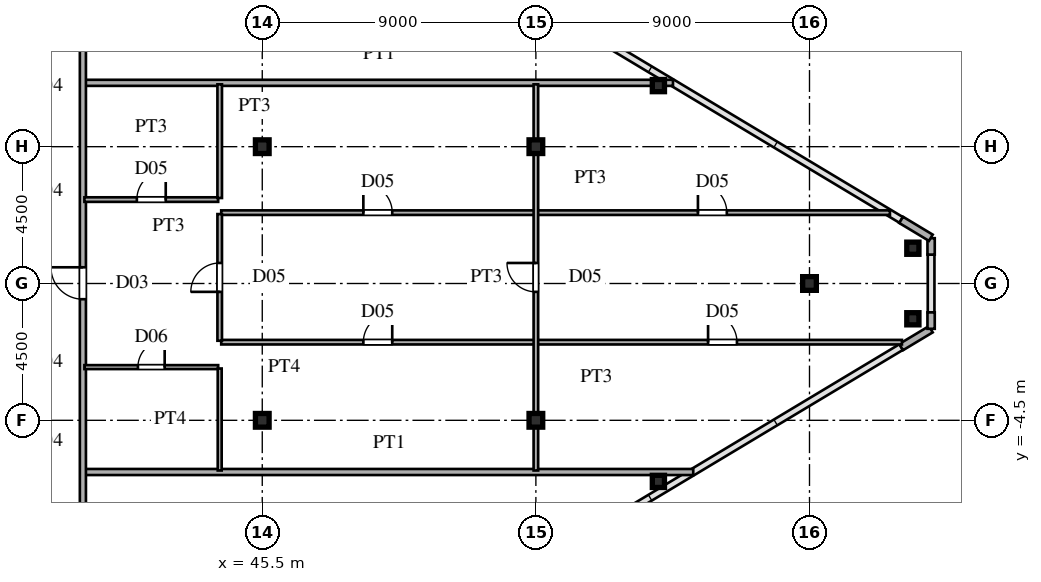
"""IFC4 building model, lengths in metres.
Left out: names, types, materials, properties, quantities, classifications, styles, units other than length and angle.
Written with IfcOpenShell. Run it as: python <this file> out.ifc"""

import sys

from ifc_helpers import new_model, si_unit, direction, frame, frame_2d, origin, origin_2d, place, context, subcontext, project, spatial, rectangle, hollow_rectangle, i_section, extrude, source, transform, mapped, element, fill, save


model = new_model("IFC4")
c1 = context("Model", 3, precision=1e-05, world=origin(), true_north=direction((0.0, 1.0)))
c2 = subcontext(c1, "Body", "Model", "MODEL_VIEW")
j1 = project(units=[si_unit("LENGTHUNIT", "METRE"), si_unit("PLANEANGLEUNIT", "RADIAN")], contexts=[c1])
p1 = place(None, origin())
s1 = spatial("IfcSite", under=j1, at=p1, CompositionType="ELEMENT")
p2 = place(p1, origin())
s2 = spatial("IfcBuilding", under=s1, at=p2, CompositionType="ELEMENT")
p3 = place(p2, frame((0.0, 0.0, 243.15)))
s3 = spatial("IfcBuildingStorey", under=s2, at=p3, CompositionType="ELEMENT", Elevation=243.15)
m1 = source(origin(), c2, "Body", "SweptSolid", [
    extrude(i_section(OverallWidth=0.45, OverallDepth=0.45, WebThickness=0.016, FlangeThickness=0.025, at=origin_2d()), origin(), (0.0, 0.0, 1.0), 3.75),
])
for number, where, z_axis, x_axis in (
    (1, (45.5, -4.5, 0.0), (0.0, 0.0, 1.0), (1.0, 0.0, 0.0)),
    (2, (45.5, 4.5, 0.0), (0.0, 0.0, 1.0), (1.0, 0.0, 0.0)),
    (3, (54.5, -4.5, 0.0), (0.0, 0.0, 1.0), (1.0, 0.0, 0.0)),
    (4, (54.5, 4.5, 0.0), (0.0, 0.0, 1.0), (1.0, 0.0, 0.0)),
    (5, (63.5, 0.0, 0.0), (0.0, 0.0, 1.0), (1.0, 0.0, 0.0)),
):
    element("IfcColumn", number, at=place(p3, frame(where, z_axis=z_axis, x_axis=x_axis)), inside=s3, PredefinedType="COLUMN", context=c2, shape_type="MappedRepresentation", body=[
        mapped(m1, transform((0.0, 0.0, 0.0), scale=1.0)),
    ])
m2 = source(origin(), c2, "Body", "SweptSolid", [
    extrude(hollow_rectangle(XDim=0.4, YDim=0.4, WallThickness=0.016, at=origin_2d()), origin(), (0.0, 0.0, 1.0), 3.75),
])
for number, where, z_axis, x_axis in (
    (6, (66.9, -1.16, 0.0), (0.0, 0.0, 1.0), (1.0, 0.0, 0.0)),
    (7, (66.9, 1.16, 0.0), (0.0, 0.0, 1.0), (1.0, 0.0, 0.0)),
    (8, (58.53, -6.509, 0.0), (0.0, 0.0, 1.0), (1.0, 0.0, 0.0)),
    (9, (58.53, 6.509, 0.0), (0.0, 0.0, 1.0), (1.0, 0.0, 0.0)),
):
    element("IfcColumn", number, at=place(p3, frame(where, z_axis=z_axis, x_axis=x_axis)), inside=s3, PredefinedType="COLUMN", context=c2, shape_type="MappedRepresentation", body=[
        mapped(m2, transform((0.0, 0.0, 0.0), scale=1.0)),
    ])
p4 = place(p3, frame((66.514, -2.092, 0.0), z_axis=(0.0, 0.0, 1.0), x_axis=(0.85743623509, 0.514590228002, 0.0)))
e10 = element("IfcWall", 10, at=p4, inside=s3, PredefinedType="SOLIDWALL", context=c2, shape_type="SweptSolid", body=[
    extrude(rectangle(XDim=1.14, YDim=0.24, at=frame_2d((0.57, 0.0))), origin(), (0.0, 0.0, 1.0), 3.53),
])
for number, where, z_axis, x_axis in (
    (11, (67.5, -1.49, 0.0), (0.0, 0.0, 1.0), (0.0, 1.0, 0.0)),
    (12, (67.5, 0.95, 0.0), (0.0, 0.0, 1.0), (0.0, 1.0, 0.0)),
):
    element("IfcWall", number, at=place(p3, frame(where, z_axis=z_axis, x_axis=x_axis)), inside=s3, PredefinedType="SOLIDWALL", context=c2, shape_type="SweptSolid", body=[
        extrude(rectangle(XDim=0.54, YDim=0.24, at=frame_2d((0.27, 0.0))), origin(), (0.0, 0.0, 1.0), 3.53),
    ])
p5 = place(p3, frame((67.491, 1.505, 0.0), z_axis=(0.0, 0.0, 1.0), x_axis=(-0.85743623509, 0.514590228002, 0.0)))
e13 = element("IfcWall", 13, at=p5, inside=s3, PredefinedType="SOLIDWALL", context=c2, shape_type="SweptSolid", body=[
    extrude(rectangle(XDim=1.14, YDim=0.24, at=frame_2d((0.57, 0.0))), origin(), (0.0, 0.0, 1.0), 3.53),
])
p6 = place(p3, frame((39.68, -6.2, 0.0), z_axis=(0.0, 0.0, 1.0), x_axis=(1.0, 0.0, 0.0)))
e14 = element("IfcWall", 14, at=p6, inside=s3, PredefinedType="PARTITIONING", context=c2, shape_type="SweptSolid", body=[
    extrude(rectangle(XDim=19.996, YDim=0.2, at=frame_2d((9.998, 0.0))), origin(), (0.0, 0.0, 1.0), 3.53),
])
p7 = place(p3, frame((39.65, -2.75, 0.0), z_axis=(0.0, 0.0, 1.0), x_axis=(1.0, 0.0, 0.0)))
e15 = element("IfcWall", 15, at=p7, inside=s3, PredefinedType="PARTITIONING", context=c2, shape_type="SweptSolid", body=[
    extrude(rectangle(XDim=4.4, YDim=0.13, at=frame_2d((2.2, 0.0))), origin(), (0.0, 0.0, 1.0), 3.53),
])
p8 = place(p7, frame((1.76, 0.0, 0.0)))
e16 = element("IfcOpeningElement", 16, at=p8, cuts=e15, PredefinedType="OPENING", context=c2, shape_type="SweptSolid", body=[
    extrude(rectangle(XDim=0.88, YDim=2.1, at=frame_2d((0.44, 1.05))), frame((0.0, 0.075, 0.0), z_axis=(0.0, -1.0, 0.0), x_axis=(1.0, 0.0, 0.0)), (0.0, 0.0, 1.0), 0.15),
])
p9 = place(p3, frame((44.15, -1.93, 0.0), z_axis=(0.0, 0.0, 1.0), x_axis=(1.0, 0.0, 0.0)))
e17 = element("IfcWall", 17, at=p9, inside=s3, PredefinedType="PARTITIONING", context=c2, shape_type="SweptSolid", body=[
    extrude(rectangle(XDim=22.39, YDim=0.15, at=frame_2d((11.195, 0.0))), origin(), (0.0, 0.0, 1.0), 3.53),
])
p10 = place(p9, frame((4.675, 0.0, 0.0)))
e18 = element("IfcOpeningElement", 18, at=p10, cuts=e17, PredefinedType="OPENING", context=c2, shape_type="SweptSolid", body=[
    extrude(rectangle(XDim=0.95, YDim=2.15, at=frame_2d((0.475, 1.075))), frame((0.0, 0.085, 0.0), z_axis=(0.0, -1.0, 0.0), x_axis=(1.0, 0.0, 0.0)), (0.0, 0.0, 1.0), 0.17),
])
p11 = place(p9, frame((16.014, 0.0, 0.0)))
e19 = element("IfcOpeningElement", 19, at=p11, cuts=e17, PredefinedType="OPENING", context=c2, shape_type="SweptSolid", body=[
    extrude(rectangle(XDim=0.95, YDim=2.15, at=frame_2d((0.475, 1.075))), frame((0.0, 0.085, 0.0), z_axis=(0.0, -1.0, 0.0), x_axis=(1.0, 0.0, 0.0)), (0.0, 0.0, 1.0), 0.17),
])
p12 = place(p3, frame((44.15, 2.33, 0.0), z_axis=(0.0, 0.0, 1.0), x_axis=(1.0, 0.0, 0.0)))
e20 = element("IfcWall", 20, at=p12, inside=s3, PredefinedType="PARTITIONING", context=c2, shape_type="SweptSolid", body=[
    extrude(rectangle(XDim=21.996, YDim=0.15, at=frame_2d((10.998, 0.0))), origin(), (0.0, 0.0, 1.0), 3.53),
])
p13 = place(p12, frame((4.675, 0.0, 0.0)))
e21 = element("IfcOpeningElement", 21, at=p13, cuts=e20, PredefinedType="OPENING", context=c2, shape_type="SweptSolid", body=[
    extrude(rectangle(XDim=0.95, YDim=2.15, at=frame_2d((0.475, 1.075))), frame((0.0, 0.085, 0.0), z_axis=(0.0, -1.0, 0.0), x_axis=(1.0, 0.0, 0.0)), (0.0, 0.0, 1.0), 0.17),
])
p14 = place(p12, frame((15.681, 0.0, 0.0)))
e22 = element("IfcOpeningElement", 22, at=p14, cuts=e20, PredefinedType="OPENING", context=c2, shape_type="SweptSolid", body=[
    extrude(rectangle(XDim=0.95, YDim=2.15, at=frame_2d((0.475, 1.075))), frame((0.0, 0.085, 0.0), z_axis=(0.0, -1.0, 0.0), x_axis=(1.0, 0.0, 0.0)), (0.0, 0.0, 1.0), 0.17),
])
p15 = place(p3, frame((39.65, 2.76, 0.0), z_axis=(0.0, 0.0, 1.0), x_axis=(1.0, 0.0, 0.0)))
e23 = element("IfcWall", 23, at=p15, inside=s3, PredefinedType="PARTITIONING", context=c2, shape_type="SweptSolid", body=[
    extrude(rectangle(XDim=4.4, YDim=0.15, at=frame_2d((2.2, 0.0))), origin(), (0.0, 0.0, 1.0), 3.53),
])
p16 = place(p15, frame((1.725, 0.0, 0.0)))
e24 = element("IfcOpeningElement", 24, at=p16, cuts=e23, PredefinedType="OPENING", context=c2, shape_type="SweptSolid", body=[
    extrude(rectangle(XDim=0.95, YDim=2.15, at=frame_2d((0.475, 1.075))), frame((0.0, 0.085, 0.0), z_axis=(0.0, -1.0, 0.0), x_axis=(1.0, 0.0, 0.0)), (0.0, 0.0, 1.0), 0.17),
])
p17 = place(p3, frame((39.68, 6.6, 0.0), z_axis=(0.0, 0.0, 1.0), x_axis=(1.0, 0.0, 0.0)))
e25 = element("IfcWall", 25, at=p17, inside=s3, PredefinedType="PARTITIONING", context=c2, shape_type="SweptSolid", body=[
    extrude(rectangle(XDim=19.33, YDim=0.2, at=frame_2d((9.665, 0.0))), origin(), (0.0, 0.0, 1.0), 3.53),
])
p18 = place(p3, frame((39.6, -15.515, 0.0), z_axis=(0.0, 0.0, 1.0), x_axis=(0.0, 1.0, 0.0)))
e26 = element("IfcWall", 26, at=p18, inside=s3, PredefinedType="PARTITIONING", context=c2, shape_type="SweptSolid", body=[
    extrude(rectangle(XDim=31.03, YDim=0.2, at=frame_2d((15.515, 0.0))), origin(), (0.0, 0.0, 1.0), 3.53),
])
p19 = place(p18, frame((4.09, 0.0, 0.0)))
e27 = element("IfcOpeningElement", 27, at=p19, cuts=e26, PredefinedType="OPENING", context=c2, shape_type="SweptSolid", body=[
    extrude(rectangle(XDim=1.05, YDim=2.25, at=frame_2d((0.525, 1.125))), frame((0.0, 0.11, 0.0), z_axis=(0.0, -1.0, 0.0), x_axis=(1.0, 0.0, 0.0)), (0.0, 0.0, 1.0), 0.22),
])
p20 = place(p18, frame((14.998, 0.0, 0.0)))
e28 = element("IfcOpeningElement", 28, at=p20, cuts=e26, PredefinedType="OPENING", context=c2, shape_type="SweptSolid", body=[
    extrude(rectangle(XDim=1.05, YDim=2.25, at=frame_2d((0.525, 1.125))), frame((0.0, 0.11, 0.0), z_axis=(0.0, -1.0, 0.0), x_axis=(1.0, 0.0, 0.0)), (0.0, 0.0, 1.0), 0.22),
])
p21 = place(p18, frame((26.09, 0.0, 0.0)))
e29 = element("IfcOpeningElement", 29, at=p21, cuts=e26, PredefinedType="OPENING", context=c2, shape_type="SweptSolid", body=[
    extrude(rectangle(XDim=1.05, YDim=2.25, at=frame_2d((0.525, 1.125))), frame((0.0, 0.11, 0.0), z_axis=(0.0, -1.0, 0.0), x_axis=(1.0, 0.0, 0.0)), (0.0, 0.0, 1.0), 0.22),
])
p22 = place(p3, frame((44.1, -6.15, 0.0), z_axis=(0.0, 0.0, 1.0), x_axis=(0.0, 1.0, 0.0)))
e30 = element("IfcWall", 30, at=p22, inside=s3, PredefinedType="PARTITIONING", context=c2, shape_type="SweptSolid", body=[
    extrude(rectangle(XDim=3.354, YDim=0.13, at=frame_2d((1.677, 0.0))), origin(), (0.0, 0.0, 1.0), 3.53),
])
p23 = place(p3, frame((44.1, -1.883, 0.0), z_axis=(0.0, 0.0, 1.0), x_axis=(0.0, 1.0, 0.0)))
e31 = element("IfcWall", 31, at=p23, inside=s3, PredefinedType="PARTITIONING", context=c2, shape_type="SweptSolid", body=[
    extrude(rectangle(XDim=4.166, YDim=0.15, at=frame_2d((2.083, 0.0))), origin(), (0.0, 0.0, 1.0), 3.53),
])
p24 = place(p23, frame((1.608, 0.0, 0.0)))
e32 = element("IfcOpeningElement", 32, at=p24, cuts=e31, PredefinedType="OPENING", context=c2, shape_type="SweptSolid", body=[
    extrude(rectangle(XDim=0.95, YDim=2.15, at=frame_2d((0.475, 1.075))), frame((0.0, 0.085, 0.0), z_axis=(0.0, -1.0, 0.0), x_axis=(1.0, 0.0, 0.0)), (0.0, 0.0, 1.0), 0.17),
])
p25 = place(p3, frame((44.1, 2.812, 0.0), z_axis=(0.0, 0.0, 1.0), x_axis=(0.0, 1.0, 0.0)))
e33 = element("IfcWall", 33, at=p25, inside=s3, PredefinedType="PARTITIONING", context=c2, shape_type="SweptSolid", body=[
    extrude(rectangle(XDim=3.738, YDim=0.15, at=frame_2d((1.869, 0.0))), origin(), (0.0, 0.0, 1.0), 3.53),
])
p26 = place(p3, frame((54.5, -6.15, 0.0), z_axis=(0.0, 0.0, 1.0), x_axis=(0.0, 1.0, 0.0)))
e34 = element("IfcWall", 34, at=p26, inside=s3, PredefinedType="PARTITIONING", context=c2, shape_type="SweptSolid", body=[
    extrude(rectangle(XDim=12.7, YDim=0.15, at=frame_2d((6.35, 0.0))), origin(), (0.0, 0.0, 1.0), 2.93),
])
p27 = place(p26, frame((5.875, 0.0, 0.0)))
e35 = element("IfcOpeningElement", 35, at=p27, cuts=e34, PredefinedType="OPENING", context=c2, shape_type="SweptSolid", body=[
    extrude(rectangle(XDim=0.95, YDim=2.15, at=frame_2d((0.475, 1.075))), frame((0.0, 0.085, 0.0), z_axis=(0.0, -1.0, 0.0), x_axis=(1.0, 0.0, 0.0)), (0.0, 0.0, 1.0), 0.17),
])
m3 = source(origin(), c2, "Body", "SweptSolid", [
    extrude(rectangle(XDim=0.88, YDim=2.1, at=frame_2d((0.44, 1.05))), frame((0.0, 0.025, 0.0), z_axis=(0.0, -1.0, 0.0), x_axis=(1.0, 0.0, 0.0)), (0.0, 0.0, 1.0), 0.05),
])
p28 = place(p8, origin())
e36 = element("IfcDoor", 36, at=p28, inside=s3, OperationType="SINGLE_SWING_RIGHT", PredefinedType="DOOR", context=c2, shape_type="MappedRepresentation", body=[
    mapped(m3, transform((0.0, 0.0, 0.0), scale=1.0)),
])
fill(e16, e36)
m4 = source(origin(), c2, "Body", "SweptSolid", [
    extrude(rectangle(XDim=0.95, YDim=2.15, at=frame_2d((0.475, 1.075))), frame((0.0, 0.025, 0.0), z_axis=(0.0, -1.0, 0.0), x_axis=(1.0, 0.0, 0.0)), (0.0, 0.0, 1.0), 0.05),
])
p29 = place(p10, origin())
e37 = element("IfcDoor", 37, at=p29, inside=s3, OperationType="SINGLE_SWING_RIGHT", PredefinedType="DOOR", context=c2, shape_type="MappedRepresentation", body=[
    mapped(m4, transform((0.0, 0.0, 0.0), scale=1.0)),
])
fill(e18, e37)
p30 = place(p11, origin())
e38 = element("IfcDoor", 38, at=p30, inside=s3, OperationType="SINGLE_SWING_LEFT", PredefinedType="DOOR", context=c2, shape_type="MappedRepresentation", body=[
    mapped(m4, transform((0.0, 0.0, 0.0), scale=1.0)),
])
fill(e19, e38)
p31 = place(p13, origin())
e39 = element("IfcDoor", 39, at=p31, inside=s3, OperationType="SINGLE_SWING_LEFT", PredefinedType="DOOR", context=c2, shape_type="MappedRepresentation", body=[
    mapped(m4, transform((0.0, 0.0, 0.0), scale=1.0)),
])
fill(e21, e39)
p32 = place(p14, origin())
e40 = element("IfcDoor", 40, at=p32, inside=s3, OperationType="SINGLE_SWING_LEFT", PredefinedType="DOOR", context=c2, shape_type="MappedRepresentation", body=[
    mapped(m4, transform((0.0, 0.0, 0.0), scale=1.0)),
])
fill(e22, e40)
p33 = place(p16, origin())
e41 = element("IfcDoor", 41, at=p33, inside=s3, OperationType="SINGLE_SWING_RIGHT", PredefinedType="DOOR", context=c2, shape_type="MappedRepresentation", body=[
    mapped(m4, transform((0.0, 0.0, 0.0), scale=1.0)),
])
fill(e24, e41)
m5 = source(origin(), c2, "Body", "SweptSolid", [
    extrude(rectangle(XDim=1.05, YDim=2.25, at=frame_2d((0.525, 1.125))), frame((0.0, 0.025, 0.0), z_axis=(0.0, -1.0, 0.0), x_axis=(1.0, 0.0, 0.0)), (0.0, 0.0, 1.0), 0.05),
])
p34 = place(p20, origin())
e42 = element("IfcDoor", 42, at=p34, inside=s3, OperationType="SINGLE_SWING_RIGHT", PredefinedType="DOOR", context=c2, shape_type="MappedRepresentation", body=[
    mapped(m5, transform((0.0, 0.0, 0.0), scale=1.0)),
])
fill(e28, e42)
p35 = place(p24, origin())
e43 = element("IfcDoor", 43, at=p35, inside=s3, OperationType="SINGLE_SWING_LEFT", PredefinedType="DOOR", context=c2, shape_type="MappedRepresentation", body=[
    mapped(m4, transform((0.0, 0.0, 0.0), scale=1.0)),
])
fill(e32, e43)
p36 = place(p27, origin())
e44 = element("IfcDoor", 44, at=p36, inside=s3, OperationType="SINGLE_SWING_RIGHT", PredefinedType="DOOR", context=c2, shape_type="MappedRepresentation", body=[
    mapped(m4, transform((0.0, 0.0, 0.0), scale=1.0)),
])
fill(e35, e44)
save(model, sys.argv[1])
